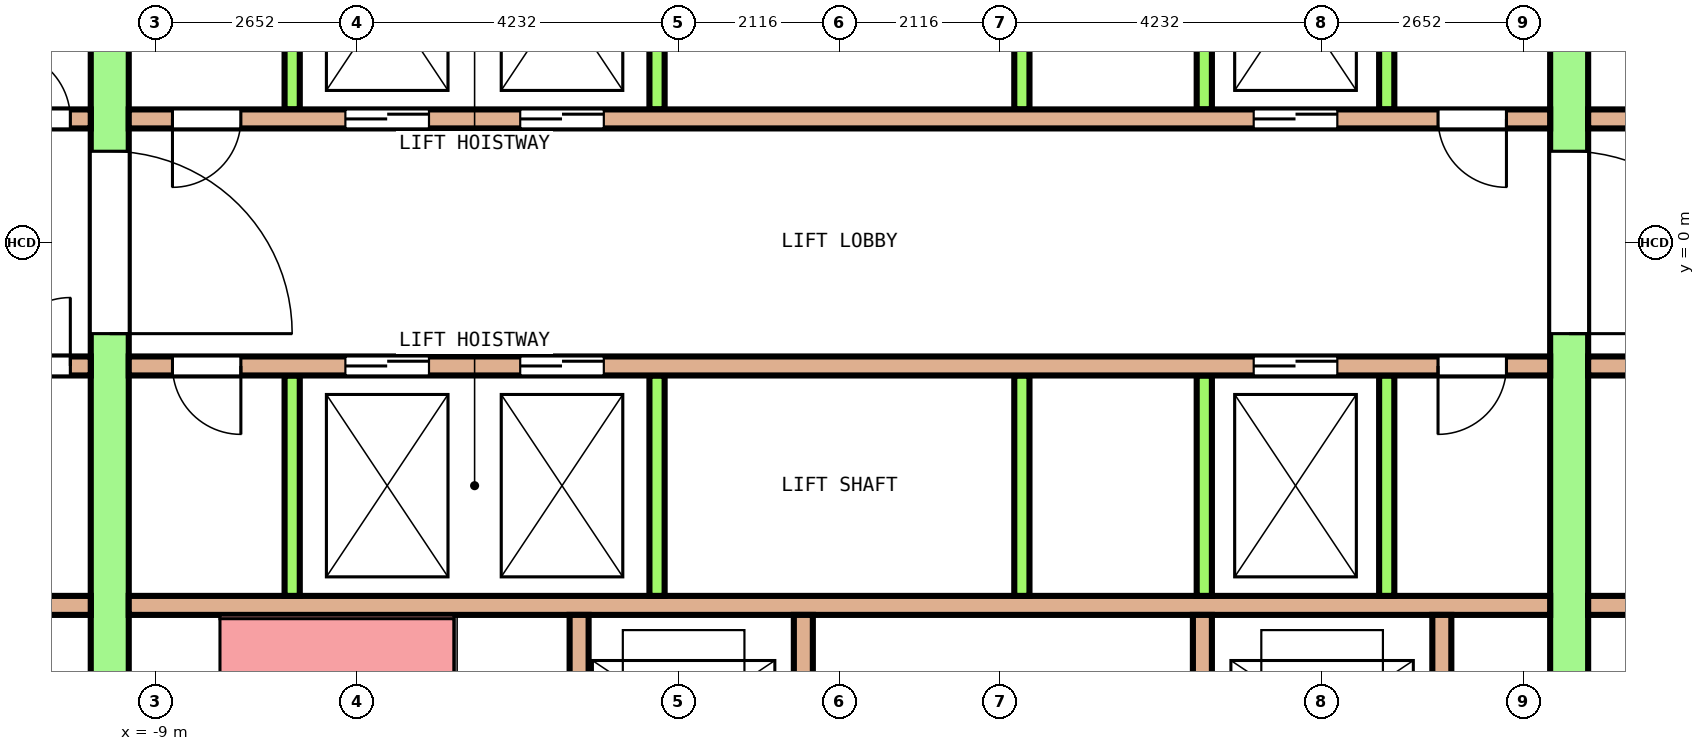
"""IFC4 building model, lengths in metres.
Left out: names, types, materials, properties, quantities, classifications, styles, units other than length and angle.
Written with IfcOpenShell. Run it as: python <this file> out.ifc"""

import sys

from ifc_helpers import new_model, si_unit, direction, frame, frame_2d, origin, place, context, subcontext, project, spatial, rectangle, extrude, element, fill, save


model = new_model("IFC4")
c1 = context("Model", 3, precision=1e-05, world=origin(), true_north=direction((0.0, 1.0)))
c2 = subcontext(c1, "Body", "Model", "MODEL_VIEW")
j1 = project(units=[si_unit("LENGTHUNIT", "METRE"), si_unit("PLANEANGLEUNIT", "RADIAN")], contexts=[c1])
p1 = place(None, origin())
s1 = spatial("IfcSite", under=j1, at=p1, CompositionType="ELEMENT")
p2 = place(p1, origin())
s2 = spatial("IfcBuilding", under=s1, at=p2, CompositionType="ELEMENT")
p3 = place(p2, frame((0.0, 0.0, 193.6)))
s3 = spatial("IfcBuildingStorey", under=s2, at=p3, CompositionType="ELEMENT", Elevation=193.6)
p4 = place(p3, frame((-9.6, -7.75, 0.0), z_axis=(0.0, 0.0, 1.0), x_axis=(0.0, 1.0, 0.0)))
e1 = element("IfcWall", 1, at=p4, inside=s3, PredefinedType="SHEAR", context=c2, shape_type="SweptSolid", body=[
    extrude(rectangle(XDim=15.5, YDim=0.5, at=frame_2d((7.75, 0.0))), origin(), (0.0, 0.0, 1.0), 4.1),
])
p5 = place(p4, frame((6.55, 0.0, 0.0)))
e2 = element("IfcOpeningElement", 2, at=p5, cuts=e1, PredefinedType="OPENING", context=c2, shape_type="SweptSolid", body=[
    extrude(rectangle(XDim=2.4, YDim=2.1, at=frame_2d((1.2, 1.05))), frame((0.0, 0.26, 0.0), z_axis=(0.0, -1.0, 0.0), x_axis=(1.0, 0.0, 0.0)), (0.0, 0.0, 1.0), 0.52),
])
p6 = place(p4, frame((13.45, 0.0, 0.0)))
e3 = element("IfcOpeningElement", 3, at=p6, cuts=e1, PredefinedType="OPENING", context=c2, shape_type="SweptSolid", body=[
    extrude(rectangle(XDim=1.2, YDim=2.1, at=frame_2d((0.6, 1.05))), frame((0.0, 0.26, 0.0), z_axis=(0.0, -1.0, 0.0), x_axis=(1.0, 0.0, 0.0)), (0.0, 0.0, 1.0), 0.52),
])
p7 = place(p4, frame((0.85, 0.0, 0.0)))
e4 = element("IfcOpeningElement", 4, at=p7, cuts=e1, PredefinedType="OPENING", context=c2, shape_type="SweptSolid", body=[
    extrude(rectangle(XDim=1.2, YDim=2.1, at=frame_2d((0.6, 1.05))), frame((0.0, 0.26, 0.0), z_axis=(0.0, -1.0, 0.0), x_axis=(1.0, 0.0, 0.0)), (0.0, 0.0, 1.0), 0.52),
])
p8 = place(p3, frame((9.6, -7.75, 0.0), z_axis=(0.0, 0.0, 1.0), x_axis=(0.0, 1.0, 0.0)))
e5 = element("IfcWall", 5, at=p8, inside=s3, PredefinedType="SHEAR", context=c2, shape_type="SweptSolid", body=[
    extrude(rectangle(XDim=15.5, YDim=0.5, at=frame_2d((7.75, 0.0))), origin(), (0.0, 0.0, 1.0), 4.1),
])
p9 = place(p8, frame((6.55, 0.0, 0.0)))
e6 = element("IfcOpeningElement", 6, at=p9, cuts=e5, PredefinedType="OPENING", context=c2, shape_type="SweptSolid", body=[
    extrude(rectangle(XDim=2.4, YDim=2.1, at=frame_2d((1.2, 1.05))), frame((0.0, 0.26, 0.0), z_axis=(0.0, -1.0, 0.0), x_axis=(1.0, 0.0, 0.0)), (0.0, 0.0, 1.0), 0.52),
])
p10 = place(p8, frame((13.45, 0.0, 0.0)))
e7 = element("IfcOpeningElement", 7, at=p10, cuts=e5, PredefinedType="OPENING", context=c2, shape_type="SweptSolid", body=[
    extrude(rectangle(XDim=1.2, YDim=2.1, at=frame_2d((0.6, 1.05))), frame((0.0, 0.26, 0.0), z_axis=(0.0, -1.0, 0.0), x_axis=(1.0, 0.0, 0.0)), (0.0, 0.0, 1.0), 0.52),
])
p11 = place(p8, frame((0.95, 0.0, 0.0)))
e8 = element("IfcOpeningElement", 8, at=p11, cuts=e5, PredefinedType="OPENING", context=c2, shape_type="SweptSolid", body=[
    extrude(rectangle(XDim=1.0, YDim=2.1, at=frame_2d((0.5, 1.05))), frame((0.0, 0.26, 0.0), z_axis=(0.0, -1.0, 0.0), x_axis=(1.0, 0.0, 0.0)), (0.0, 0.0, 1.0), 0.52),
])
p12 = place(p3, frame((-12.85, 1.625, 0.0), z_axis=(0.0, 0.0, 1.0), x_axis=(1.0, 0.0, 0.0)))
e9 = element("IfcWall", 9, at=p12, inside=s3, PredefinedType="SOLIDWALL", context=c2, shape_type="SweptSolid", body=[
    extrude(rectangle(XDim=3.0, YDim=0.25, at=frame_2d((1.5, 0.0))), origin(), (0.0, 0.0, 1.0), 4.1),
])
p13 = place(p12, frame((0.269, 0.0, 0.0)))
e10 = element("IfcOpeningElement", 10, at=p13, cuts=e9, PredefinedType="OPENING", context=c2, shape_type="SweptSolid", body=[
    extrude(rectangle(XDim=0.9, YDim=2.1, at=frame_2d((0.45, 1.05))), frame((0.0, 0.135, 0.0), z_axis=(0.0, -1.0, 0.0), x_axis=(1.0, 0.0, 0.0)), (0.0, 0.0, 1.0), 0.27),
])
p14 = place(p12, frame((1.831, 0.0, 0.0)))
e11 = element("IfcOpeningElement", 11, at=p14, cuts=e9, PredefinedType="OPENING", context=c2, shape_type="SweptSolid", body=[
    extrude(rectangle(XDim=0.9, YDim=2.1, at=frame_2d((0.45, 1.05))), frame((0.0, 0.135, 0.0), z_axis=(0.0, -1.0, 0.0), x_axis=(1.0, 0.0, 0.0)), (0.0, 0.0, 1.0), 0.27),
])
p15 = place(p3, frame((-9.35, 1.625, 0.0), z_axis=(0.0, 0.0, 1.0), x_axis=(1.0, 0.0, 0.0)))
e12 = element("IfcWall", 12, at=p15, inside=s3, PredefinedType="SOLIDWALL", context=c2, shape_type="SweptSolid", body=[
    extrude(rectangle(XDim=18.7, YDim=0.25, at=frame_2d((9.35, 0.0))), origin(), (0.0, 0.0, 1.0), 4.1),
])
p16 = place(p15, frame((2.85, 0.0, 0.0)))
e13 = element("IfcOpeningElement", 13, at=p16, cuts=e12, PredefinedType="OPENING", context=c2, shape_type="SweptSolid", body=[
    extrude(rectangle(XDim=1.1, YDim=2.1, at=frame_2d((0.55, 1.05))), frame((0.0, 0.135, 0.0), z_axis=(0.0, -1.0, 0.0), x_axis=(1.0, 0.0, 0.0)), (0.0, 0.0, 1.0), 0.27),
])
p17 = place(p15, frame((5.15, 0.0, 0.0)))
e14 = element("IfcOpeningElement", 14, at=p17, cuts=e12, PredefinedType="OPENING", context=c2, shape_type="SweptSolid", body=[
    extrude(rectangle(XDim=1.1, YDim=2.1, at=frame_2d((0.55, 1.05))), frame((0.0, 0.135, 0.0), z_axis=(0.0, -1.0, 0.0), x_axis=(1.0, 0.0, 0.0)), (0.0, 0.0, 1.0), 0.27),
])
p18 = place(p15, frame((14.8, 0.0, 0.0)))
e15 = element("IfcOpeningElement", 15, at=p18, cuts=e12, PredefinedType="OPENING", context=c2, shape_type="SweptSolid", body=[
    extrude(rectangle(XDim=1.1, YDim=2.1, at=frame_2d((0.55, 1.05))), frame((0.0, 0.135, 0.0), z_axis=(0.0, -1.0, 0.0), x_axis=(1.0, 0.0, 0.0)), (0.0, 0.0, 1.0), 0.27),
])
p19 = place(p15, frame((0.575, 0.0, 0.0)))
e16 = element("IfcOpeningElement", 16, at=p19, cuts=e12, PredefinedType="OPENING", context=c2, shape_type="SweptSolid", body=[
    extrude(rectangle(XDim=0.9, YDim=2.1, at=frame_2d((0.45, 1.05))), frame((0.0, 0.135, 0.0), z_axis=(0.0, -1.0, 0.0), x_axis=(1.0, 0.0, 0.0)), (0.0, 0.0, 1.0), 0.27),
])
p20 = place(p15, frame((17.225, 0.0, 0.0)))
e17 = element("IfcOpeningElement", 17, at=p20, cuts=e12, PredefinedType="OPENING", context=c2, shape_type="SweptSolid", body=[
    extrude(rectangle(XDim=0.9, YDim=2.1, at=frame_2d((0.45, 1.05))), frame((0.0, 0.135, 0.0), z_axis=(0.0, -1.0, 0.0), x_axis=(1.0, 0.0, 0.0)), (0.0, 0.0, 1.0), 0.27),
])
p21 = place(p3, frame((9.85, 1.625, 0.0), z_axis=(0.0, 0.0, 1.0), x_axis=(1.0, 0.0, 0.0)))
e18 = element("IfcWall", 18, at=p21, inside=s3, PredefinedType="SOLIDWALL", context=c2, shape_type="SweptSolid", body=[
    extrude(rectangle(XDim=3.0, YDim=0.25, at=frame_2d((1.5, 0.0))), origin(), (0.0, 0.0, 1.0), 4.1),
])
p22 = place(p21, frame((1.05, 0.0, 0.0)))
e19 = element("IfcOpeningElement", 19, at=p22, cuts=e18, PredefinedType="OPENING", context=c2, shape_type="SweptSolid", body=[
    extrude(rectangle(XDim=0.9, YDim=2.1, at=frame_2d((0.45, 1.05))), frame((0.0, 0.135, 0.0), z_axis=(0.0, -1.0, 0.0), x_axis=(1.0, 0.0, 0.0)), (0.0, 0.0, 1.0), 0.27),
])
for number, where, z_axis, x_axis in (
    (20, (-7.2, 1.75, 0.0), (0.0, 0.0, 1.0), (0.0, 1.0, 0.0)),
    (21, (-2.4, 1.75, 0.0), (0.0, 0.0, 1.0), (0.0, 1.0, 0.0)),
    (22, (2.4, 1.75, 0.0), (0.0, 0.0, 1.0), (0.0, 1.0, 0.0)),
    (23, (4.8, 1.75, 0.0), (0.0, 0.0, 1.0), (0.0, 1.0, 0.0)),
    (24, (7.2, 1.75, 0.0), (0.0, 0.0, 1.0), (0.0, 1.0, 0.0)),
):
    element("IfcWall", number, at=place(p3, frame(where, z_axis=z_axis, x_axis=x_axis)), inside=s3, PredefinedType="SOLIDWALL", context=c2, shape_type="SweptSolid", body=[
        extrude(rectangle(XDim=2.9, YDim=0.2, at=frame_2d((1.45, 0.0))), origin(), (0.0, 0.0, 1.0), 4.1),
    ])
p23 = place(p3, frame((-12.85, -1.625, 0.0), z_axis=(0.0, 0.0, 1.0), x_axis=(1.0, 0.0, 0.0)))
e25 = element("IfcWall", 25, at=p23, inside=s3, PredefinedType="SOLIDWALL", context=c2, shape_type="SweptSolid", body=[
    extrude(rectangle(XDim=3.0, YDim=0.25, at=frame_2d((1.5, 0.0))), origin(), (0.0, 0.0, 1.0), 4.1),
])
p24 = place(p23, frame((0.269, 0.0, 0.0)))
e26 = element("IfcOpeningElement", 26, at=p24, cuts=e25, PredefinedType="OPENING", context=c2, shape_type="SweptSolid", body=[
    extrude(rectangle(XDim=0.9, YDim=2.1, at=frame_2d((0.45, 1.05))), frame((0.0, 0.135, 0.0), z_axis=(0.0, -1.0, 0.0), x_axis=(1.0, 0.0, 0.0)), (0.0, 0.0, 1.0), 0.27),
])
p25 = place(p23, frame((1.831, 0.0, 0.0)))
e27 = element("IfcOpeningElement", 27, at=p25, cuts=e25, PredefinedType="OPENING", context=c2, shape_type="SweptSolid", body=[
    extrude(rectangle(XDim=0.9, YDim=2.1, at=frame_2d((0.45, 1.05))), frame((0.0, 0.135, 0.0), z_axis=(0.0, -1.0, 0.0), x_axis=(1.0, 0.0, 0.0)), (0.0, 0.0, 1.0), 0.27),
])
p26 = place(p3, frame((-9.35, -1.625, 0.0), z_axis=(0.0, 0.0, 1.0), x_axis=(1.0, 0.0, 0.0)))
e28 = element("IfcWall", 28, at=p26, inside=s3, PredefinedType="SOLIDWALL", context=c2, shape_type="SweptSolid", body=[
    extrude(rectangle(XDim=18.7, YDim=0.25, at=frame_2d((9.35, 0.0))), origin(), (0.0, 0.0, 1.0), 4.1),
])
p27 = place(p26, frame((2.85, 0.0, 0.0)))
e29 = element("IfcOpeningElement", 29, at=p27, cuts=e28, PredefinedType="OPENING", context=c2, shape_type="SweptSolid", body=[
    extrude(rectangle(XDim=1.1, YDim=2.1, at=frame_2d((0.55, 1.05))), frame((0.0, 0.135, 0.0), z_axis=(0.0, -1.0, 0.0), x_axis=(1.0, 0.0, 0.0)), (0.0, 0.0, 1.0), 0.27),
])
p28 = place(p26, frame((5.15, 0.0, 0.0)))
e30 = element("IfcOpeningElement", 30, at=p28, cuts=e28, PredefinedType="OPENING", context=c2, shape_type="SweptSolid", body=[
    extrude(rectangle(XDim=1.1, YDim=2.1, at=frame_2d((0.55, 1.05))), frame((0.0, 0.135, 0.0), z_axis=(0.0, -1.0, 0.0), x_axis=(1.0, 0.0, 0.0)), (0.0, 0.0, 1.0), 0.27),
])
p29 = place(p26, frame((14.8, 0.0, 0.0)))
e31 = element("IfcOpeningElement", 31, at=p29, cuts=e28, PredefinedType="OPENING", context=c2, shape_type="SweptSolid", body=[
    extrude(rectangle(XDim=1.1, YDim=2.1, at=frame_2d((0.55, 1.05))), frame((0.0, 0.135, 0.0), z_axis=(0.0, -1.0, 0.0), x_axis=(1.0, 0.0, 0.0)), (0.0, 0.0, 1.0), 0.27),
])
p30 = place(p26, frame((0.575, 0.0, 0.0)))
e32 = element("IfcOpeningElement", 32, at=p30, cuts=e28, PredefinedType="OPENING", context=c2, shape_type="SweptSolid", body=[
    extrude(rectangle(XDim=0.9, YDim=2.1, at=frame_2d((0.45, 1.05))), frame((0.0, 0.135, 0.0), z_axis=(0.0, -1.0, 0.0), x_axis=(1.0, 0.0, 0.0)), (0.0, 0.0, 1.0), 0.27),
])
p31 = place(p26, frame((17.225, 0.0, 0.0)))
e33 = element("IfcOpeningElement", 33, at=p31, cuts=e28, PredefinedType="OPENING", context=c2, shape_type="SweptSolid", body=[
    extrude(rectangle(XDim=0.9, YDim=2.1, at=frame_2d((0.45, 1.05))), frame((0.0, 0.135, 0.0), z_axis=(0.0, -1.0, 0.0), x_axis=(1.0, 0.0, 0.0)), (0.0, 0.0, 1.0), 0.27),
])
p32 = place(p3, frame((9.85, -1.625, 0.0), z_axis=(0.0, 0.0, 1.0), x_axis=(1.0, 0.0, 0.0)))
e34 = element("IfcWall", 34, at=p32, inside=s3, PredefinedType="SOLIDWALL", context=c2, shape_type="SweptSolid", body=[
    extrude(rectangle(XDim=3.0, YDim=0.25, at=frame_2d((1.5, 0.0))), origin(), (0.0, 0.0, 1.0), 4.1),
])
p33 = place(p32, frame((1.05, 0.0, 0.0)))
e35 = element("IfcOpeningElement", 35, at=p33, cuts=e34, PredefinedType="OPENING", context=c2, shape_type="SweptSolid", body=[
    extrude(rectangle(XDim=0.9, YDim=2.1, at=frame_2d((0.45, 1.05))), frame((0.0, 0.135, 0.0), z_axis=(0.0, -1.0, 0.0), x_axis=(1.0, 0.0, 0.0)), (0.0, 0.0, 1.0), 0.27),
])
p34 = place(p3, frame((-12.85, -4.775, 0.0), z_axis=(0.0, 0.0, 1.0), x_axis=(1.0, 0.0, 0.0)))
e36 = element("IfcWall", 36, at=p34, inside=s3, PredefinedType="SOLIDWALL", context=c2, shape_type="SweptSolid", body=[
    extrude(rectangle(XDim=3.0, YDim=0.25, at=frame_2d((1.5, 0.0))), origin(), (0.0, 0.0, 1.0), 4.1),
])
p35 = place(p3, frame((-9.35, -4.775, 0.0), z_axis=(0.0, 0.0, 1.0), x_axis=(1.0, 0.0, 0.0)))
e37 = element("IfcWall", 37, at=p35, inside=s3, PredefinedType="SOLIDWALL", context=c2, shape_type="SweptSolid", body=[
    extrude(rectangle(XDim=18.7, YDim=0.25, at=frame_2d((9.35, 0.0))), origin(), (0.0, 0.0, 1.0), 4.1),
])
p36 = place(p3, frame((9.85, -4.775, 0.0), z_axis=(0.0, 0.0, 1.0), x_axis=(1.0, 0.0, 0.0)))
e38 = element("IfcWall", 38, at=p36, inside=s3, PredefinedType="SOLIDWALL", context=c2, shape_type="SweptSolid", body=[
    extrude(rectangle(XDim=3.0, YDim=0.25, at=frame_2d((1.5, 0.0))), origin(), (0.0, 0.0, 1.0), 4.1),
])
for number, where, z_axis, x_axis in (
    (39, (-7.2, -4.65, 0.0), (0.0, 0.0, 1.0), (0.0, 1.0, 0.0)),
    (40, (-2.4, -4.65, 0.0), (0.0, 0.0, 1.0), (0.0, 1.0, 0.0)),
    (41, (2.4, -4.65, 0.0), (0.0, 0.0, 1.0), (0.0, 1.0, 0.0)),
    (42, (4.8, -4.65, 0.0), (0.0, 0.0, 1.0), (0.0, 1.0, 0.0)),
    (43, (7.2, -4.65, 0.0), (0.0, 0.0, 1.0), (0.0, 1.0, 0.0)),
):
    element("IfcWall", number, at=place(p3, frame(where, z_axis=z_axis, x_axis=x_axis)), inside=s3, PredefinedType="SOLIDWALL", context=c2, shape_type="SweptSolid", body=[
        extrude(rectangle(XDim=2.9, YDim=0.2, at=frame_2d((1.45, 0.0))), origin(), (0.0, 0.0, 1.0), 4.1),
    ])
p37 = place(p3, frame((-3.425, -7.75, 0.0), z_axis=(0.0, 0.0, 1.0), x_axis=(0.0, 1.0, 0.0)))
e44 = element("IfcWall", 44, at=p37, inside=s3, PredefinedType="SOLIDWALL", context=c2, shape_type="SweptSolid", body=[
    extrude(rectangle(XDim=2.85, YDim=0.25, at=frame_2d((1.425, 0.0))), origin(), (0.0, 0.0, 1.0), 4.1),
])
p38 = place(p3, frame((-0.475, -7.75, 0.0), z_axis=(0.0, 0.0, 1.0), x_axis=(0.0, 1.0, 0.0)))
e45 = element("IfcWall", 45, at=p38, inside=s3, PredefinedType="SOLIDWALL", context=c2, shape_type="SweptSolid", body=[
    extrude(rectangle(XDim=2.85, YDim=0.25, at=frame_2d((1.425, 0.0))), origin(), (0.0, 0.0, 1.0), 4.1),
])
p39 = place(p38, frame((0.875, 0.0, 0.0)))
e46 = element("IfcOpeningElement", 46, at=p39, cuts=e45, PredefinedType="OPENING", context=c2, shape_type="SweptSolid", body=[
    extrude(rectangle(XDim=1.1, YDim=2.1, at=frame_2d((0.55, 1.05))), frame((0.0, 0.135, 0.0), z_axis=(0.0, -1.0, 0.0), x_axis=(1.0, 0.0, 0.0)), (0.0, 0.0, 1.0), 0.27),
])
p40 = place(p3, frame((4.775, -7.75, 0.0), z_axis=(0.0, 0.0, 1.0), x_axis=(0.0, 1.0, 0.0)))
e47 = element("IfcWall", 47, at=p40, inside=s3, PredefinedType="SOLIDWALL", context=c2, shape_type="SweptSolid", body=[
    extrude(rectangle(XDim=2.85, YDim=0.25, at=frame_2d((1.425, 0.0))), origin(), (0.0, 0.0, 1.0), 4.1),
])
p41 = place(p40, frame((0.875, 0.0, 0.0)))
e48 = element("IfcOpeningElement", 48, at=p41, cuts=e47, PredefinedType="OPENING", context=c2, shape_type="SweptSolid", body=[
    extrude(rectangle(XDim=1.1, YDim=2.1, at=frame_2d((0.55, 1.05))), frame((0.0, 0.135, 0.0), z_axis=(0.0, -1.0, 0.0), x_axis=(1.0, 0.0, 0.0)), (0.0, 0.0, 1.0), 0.27),
])
p42 = place(p3, frame((7.925, -7.75, 0.0), z_axis=(0.0, 0.0, 1.0), x_axis=(0.0, 1.0, 0.0)))
e49 = element("IfcWall", 49, at=p42, inside=s3, PredefinedType="SOLIDWALL", context=c2, shape_type="SweptSolid", body=[
    extrude(rectangle(XDim=2.85, YDim=0.25, at=frame_2d((1.425, 0.0))), origin(), (0.0, 0.0, 1.0), 4.1),
])
p43 = place(p16, origin())
e50 = element("IfcDoor", 50, at=p43, inside=s3, OperationType="DOUBLE_DOOR_SLIDING", PredefinedType="DOOR", context=c2, shape_type="SweptSolid", body=[
    extrude(rectangle(XDim=1.1, YDim=2.1, at=frame_2d((0.55, 1.05))), frame((0.0, 0.075, 0.0), z_axis=(0.0, -1.0, 0.0), x_axis=(1.0, 0.0, 0.0)), (0.0, 0.0, 1.0), 0.15),
])
fill(e13, e50)
p44 = place(p17, origin())
e51 = element("IfcDoor", 51, at=p44, inside=s3, OperationType="DOUBLE_DOOR_SLIDING", PredefinedType="DOOR", context=c2, shape_type="SweptSolid", body=[
    extrude(rectangle(XDim=1.1, YDim=2.1, at=frame_2d((0.55, 1.05))), frame((0.0, 0.075, 0.0), z_axis=(0.0, -1.0, 0.0), x_axis=(1.0, 0.0, 0.0)), (0.0, 0.0, 1.0), 0.15),
])
fill(e14, e51)
p45 = place(p18, origin())
e52 = element("IfcDoor", 52, at=p45, inside=s3, OperationType="DOUBLE_DOOR_SLIDING", PredefinedType="DOOR", context=c2, shape_type="SweptSolid", body=[
    extrude(rectangle(XDim=1.1, YDim=2.1, at=frame_2d((0.55, 1.05))), frame((0.0, 0.075, 0.0), z_axis=(0.0, -1.0, 0.0), x_axis=(1.0, 0.0, 0.0)), (0.0, 0.0, 1.0), 0.15),
])
fill(e15, e52)
p46 = place(p27, origin())
e53 = element("IfcDoor", 53, at=p46, inside=s3, OperationType="DOUBLE_DOOR_SLIDING", PredefinedType="DOOR", context=c2, shape_type="SweptSolid", body=[
    extrude(rectangle(XDim=1.1, YDim=2.1, at=frame_2d((0.55, 1.05))), frame((0.0, 0.075, 0.0), z_axis=(0.0, -1.0, 0.0), x_axis=(1.0, 0.0, 0.0)), (0.0, 0.0, 1.0), 0.15),
])
fill(e29, e53)
p47 = place(p28, origin())
e54 = element("IfcDoor", 54, at=p47, inside=s3, OperationType="DOUBLE_DOOR_SLIDING", PredefinedType="DOOR", context=c2, shape_type="SweptSolid", body=[
    extrude(rectangle(XDim=1.1, YDim=2.1, at=frame_2d((0.55, 1.05))), frame((0.0, 0.075, 0.0), z_axis=(0.0, -1.0, 0.0), x_axis=(1.0, 0.0, 0.0)), (0.0, 0.0, 1.0), 0.15),
])
fill(e30, e54)
p48 = place(p29, origin())
e55 = element("IfcDoor", 55, at=p48, inside=s3, OperationType="DOUBLE_DOOR_SLIDING", PredefinedType="DOOR", context=c2, shape_type="SweptSolid", body=[
    extrude(rectangle(XDim=1.1, YDim=2.1, at=frame_2d((0.55, 1.05))), frame((0.0, 0.075, 0.0), z_axis=(0.0, -1.0, 0.0), x_axis=(1.0, 0.0, 0.0)), (0.0, 0.0, 1.0), 0.15),
])
fill(e31, e55)
p49 = place(p5, origin())
e56 = element("IfcDoor", 56, at=p49, inside=s3, OperationType="DOUBLE_DOOR_SINGLE_SWING", PredefinedType="DOOR", context=c2, shape_type="SweptSolid", body=[
    extrude(rectangle(XDim=2.4, YDim=2.1, at=frame_2d((1.2, 1.05))), frame((0.0, 0.2, 0.0), z_axis=(0.0, -1.0, 0.0), x_axis=(1.0, 0.0, 0.0)), (0.0, 0.0, 1.0), 0.4),
])
fill(e2, e56)
p50 = place(p9, origin())
e57 = element("IfcDoor", 57, at=p50, inside=s3, OperationType="DOUBLE_DOOR_SINGLE_SWING", PredefinedType="DOOR", context=c2, shape_type="SweptSolid", body=[
    extrude(rectangle(XDim=2.4, YDim=2.1, at=frame_2d((1.2, 1.05))), frame((0.0, 0.2, 0.0), z_axis=(0.0, -1.0, 0.0), x_axis=(1.0, 0.0, 0.0)), (0.0, 0.0, 1.0), 0.4),
])
fill(e6, e57)
p51 = place(p14, origin())
e58 = element("IfcDoor", 58, at=p51, inside=s3, OperationType="SINGLE_SWING_LEFT", PredefinedType="DOOR", context=c2, shape_type="SweptSolid", body=[
    extrude(rectangle(XDim=0.9, YDim=2.1, at=frame_2d((0.45, 1.05))), frame((0.0, 0.075, 0.0), z_axis=(0.0, -1.0, 0.0), x_axis=(1.0, 0.0, 0.0)), (0.0, 0.0, 1.0), 0.15),
])
fill(e11, e58)
p52 = place(p19, origin())
e59 = element("IfcDoor", 59, at=p52, inside=s3, OperationType="SINGLE_SWING_RIGHT", PredefinedType="DOOR", context=c2, shape_type="SweptSolid", body=[
    extrude(rectangle(XDim=0.9, YDim=2.1, at=frame_2d((0.45, 1.05))), frame((0.0, 0.075, 0.0), z_axis=(0.0, -1.0, 0.0), x_axis=(1.0, 0.0, 0.0)), (0.0, 0.0, 1.0), 0.15),
])
fill(e16, e59)
p53 = place(p20, origin())
e60 = element("IfcDoor", 60, at=p53, inside=s3, OperationType="SINGLE_SWING_LEFT", PredefinedType="DOOR", context=c2, shape_type="SweptSolid", body=[
    extrude(rectangle(XDim=0.9, YDim=2.1, at=frame_2d((0.45, 1.05))), frame((0.0, 0.075, 0.0), z_axis=(0.0, -1.0, 0.0), x_axis=(1.0, 0.0, 0.0)), (0.0, 0.0, 1.0), 0.15),
])
fill(e17, e60)
p54 = place(p25, origin())
e61 = element("IfcDoor", 61, at=p54, inside=s3, OperationType="SINGLE_SWING_RIGHT", PredefinedType="DOOR", context=c2, shape_type="SweptSolid", body=[
    extrude(rectangle(XDim=0.9, YDim=2.1, at=frame_2d((0.45, 1.05))), frame((0.0, 0.075, 0.0), z_axis=(0.0, -1.0, 0.0), x_axis=(1.0, 0.0, 0.0)), (0.0, 0.0, 1.0), 0.15),
])
fill(e27, e61)
p55 = place(p30, origin())
e62 = element("IfcDoor", 62, at=p55, inside=s3, OperationType="SINGLE_SWING_LEFT", PredefinedType="DOOR", context=c2, shape_type="SweptSolid", body=[
    extrude(rectangle(XDim=0.9, YDim=2.1, at=frame_2d((0.45, 1.05))), frame((0.0, 0.075, 0.0), z_axis=(0.0, -1.0, 0.0), x_axis=(1.0, 0.0, 0.0)), (0.0, 0.0, 1.0), 0.15),
])
fill(e32, e62)
p56 = place(p31, origin())
e63 = element("IfcDoor", 63, at=p56, inside=s3, OperationType="SINGLE_SWING_RIGHT", PredefinedType="DOOR", context=c2, shape_type="SweptSolid", body=[
    extrude(rectangle(XDim=0.9, YDim=2.1, at=frame_2d((0.45, 1.05))), frame((0.0, 0.075, 0.0), z_axis=(0.0, -1.0, 0.0), x_axis=(1.0, 0.0, 0.0)), (0.0, 0.0, 1.0), 0.15),
])
fill(e33, e63)
save(model, sys.argv[1])
